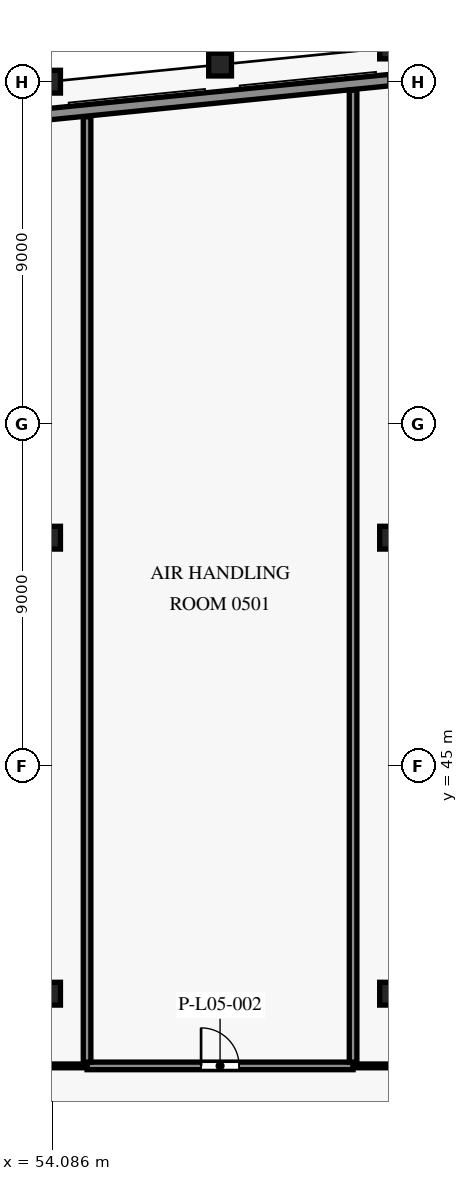
"""IFC4 building model, lengths in metres.
Left out: names, types, materials, properties, quantities, classifications, styles, units other than length and angle.
Written with IfcOpenShell. Run it as: python <this file> out.ifc"""

import sys

from ifc_helpers import new_model, si_unit, direction, frame, frame_2d, origin, origin_2d, place, context, subcontext, project, spatial, rectangle, hollow_rectangle, extrude, element, fill, save


model = new_model("IFC4")
c1 = context("Model", 3, precision=1e-05, world=origin(), true_north=direction((0.0, 1.0)))
c2 = subcontext(c1, "Body", "Model", "MODEL_VIEW")
j1 = project(units=[si_unit("LENGTHUNIT", "METRE"), si_unit("PLANEANGLEUNIT", "RADIAN")], contexts=[c1])
p1 = place(None, origin())
s1 = spatial("IfcSite", under=j1, at=p1, CompositionType="ELEMENT")
p2 = place(p1, origin())
s2 = spatial("IfcBuilding", under=s1, at=p2, CompositionType="ELEMENT")
p3 = place(p2, frame((0.0, 0.0, 32.0)))
s3 = spatial("IfcBuildingStorey", under=s2, at=p3, CompositionType="ELEMENT", Elevation=32.0)
for number, where, z_axis, x_axis in (
    (1, (54.0, 39.0, 0.0), (0.0, 0.0, 1.0), (1.0, 0.0, 0.0)),
    (2, (54.0, 51.0, 0.0), (0.0, 0.0, 1.0), (1.0, 0.0, 0.0)),
    (3, (63.0, 39.0, 0.0), (0.0, 0.0, 1.0), (1.0, 0.0, 0.0)),
    (4, (63.0, 51.0, 0.0), (0.0, 0.0, 1.0), (1.0, 0.0, 0.0)),
    (5, (54.0, 63.0, 0.0), (0.0, 0.0, 1.0), (1.0, 0.0, 0.0)),
    (6, (58.5, 63.45, 0.0), (0.0, 0.0, 1.0), (1.0, 0.0, 0.0)),
    (7, (63.0, 63.9, 0.0), (0.0, 0.0, 1.0), (1.0, 0.0, 0.0)),
):
    element("IfcColumn", number, at=place(p3, frame(where, z_axis=z_axis, x_axis=x_axis)), inside=s3, PredefinedType="COLUMN", context=c2, shape_type="SweptSolid", body=[
        extrude(hollow_rectangle(XDim=0.6, YDim=0.6, WallThickness=0.03, InnerFilletRadius=0.03, OuterFilletRadius=0.06, at=origin_2d()), origin(), (0.0, 0.0, 1.0), 5.5),
    ])
p4 = place(p3, frame((53.985, 62.144, 0.0), z_axis=(0.0, 0.0, 1.0), x_axis=(0.995037993253, 0.099495688264, 0.0)))
e8 = element("IfcWall", 8, at=p4, inside=s3, PredefinedType="SOLIDWALL", context=c2, shape_type="SweptSolid", body=[
    extrude(rectangle(XDim=9.03, YDim=0.3, at=frame_2d((4.515, 0.0))), origin(), (0.0, 0.0, 1.0), 4.85),
])
p5 = place(p3, frame((51.25, 37.1, 0.0), z_axis=(0.0, 0.0, 1.0), x_axis=(1.0, 0.0, 0.0)))
e9 = element("IfcWall", 9, at=p5, inside=s3, PredefinedType="PARTITIONING", context=c2, shape_type="SweptSolid", body=[
    extrude(rectangle(XDim=3.75, YDim=0.1, at=frame_2d((1.875, 0.0))), origin(), (0.0, 0.0, 1.0), 5.18),
])
p6 = place(p3, frame((55.0, 37.1, 0.0), z_axis=(0.0, 0.0, 1.0), x_axis=(1.0, 0.0, 0.0)))
e10 = element("IfcWall", 10, at=p6, inside=s3, PredefinedType="PARTITIONING", context=c2, shape_type="SweptSolid", body=[
    extrude(rectangle(XDim=7.0, YDim=0.2, at=frame_2d((3.5, 0.0))), origin(), (0.0, 0.0, 1.0), 5.18),
])
p7 = place(p6, frame((3.0, 0.0, 0.0)))
e11 = element("IfcOpeningElement", 11, at=p7, cuts=e10, PredefinedType="OPENING", context=c2, shape_type="SweptSolid", body=[
    extrude(rectangle(XDim=1.0, YDim=2.1, at=frame_2d((0.5, 1.05))), frame((0.0, 0.11, 0.0), z_axis=(0.0, -1.0, 0.0), x_axis=(1.0, 0.0, 0.0)), (0.0, 0.0, 1.0), 0.22),
])
p8 = place(p3, frame((62.0, 37.1, 0.0), z_axis=(0.0, 0.0, 1.0), x_axis=(1.0, 0.0, 0.0)))
e12 = element("IfcWall", 12, at=p8, inside=s3, PredefinedType="PARTITIONING", context=c2, shape_type="SweptSolid", body=[
    extrude(rectangle(XDim=2.05, YDim=0.1, at=frame_2d((1.025, 0.0))), origin(), (0.0, 0.0, 1.0), 5.18),
])
p9 = place(p3, frame((55.0, 37.2, 0.0), z_axis=(0.0, 0.0, 1.0), x_axis=(0.0, 1.0, 0.0)))
e13 = element("IfcWall", 13, at=p9, inside=s3, PredefinedType="PARTITIONING", context=c2, shape_type="SweptSolid", body=[
    extrude(rectangle(XDim=24.875, YDim=0.2, at=frame_2d((12.438, 0.0))), origin(), (0.0, 0.0, 1.0), 5.18),
])
p10 = place(p3, frame((62.0, 62.775, 0.0), z_axis=(0.0, 0.0, 1.0), x_axis=(0.0, -1.0, 0.0)))
e14 = element("IfcWall", 14, at=p10, inside=s3, PredefinedType="PARTITIONING", context=c2, shape_type="SweptSolid", body=[
    extrude(rectangle(XDim=25.575, YDim=0.2, at=frame_2d((12.788, 0.0))), origin(), (0.0, 0.0, 1.0), 5.18),
])
p11 = place(p7, origin())
e15 = element("IfcDoor", 15, at=p11, inside=s3, OperationType="SINGLE_SWING_LEFT", PredefinedType="DOOR", context=c2, shape_type="SweptSolid", body=[
    extrude(rectangle(XDim=1.0, YDim=2.1, at=frame_2d((0.5, 1.05))), frame((0.0, 0.025, 0.0), z_axis=(0.0, -1.0, 0.0), x_axis=(1.0, 0.0, 0.0)), (0.0, 0.0, 1.0), 0.05),
])
fill(e11, e15)
save(model, sys.argv[1])
